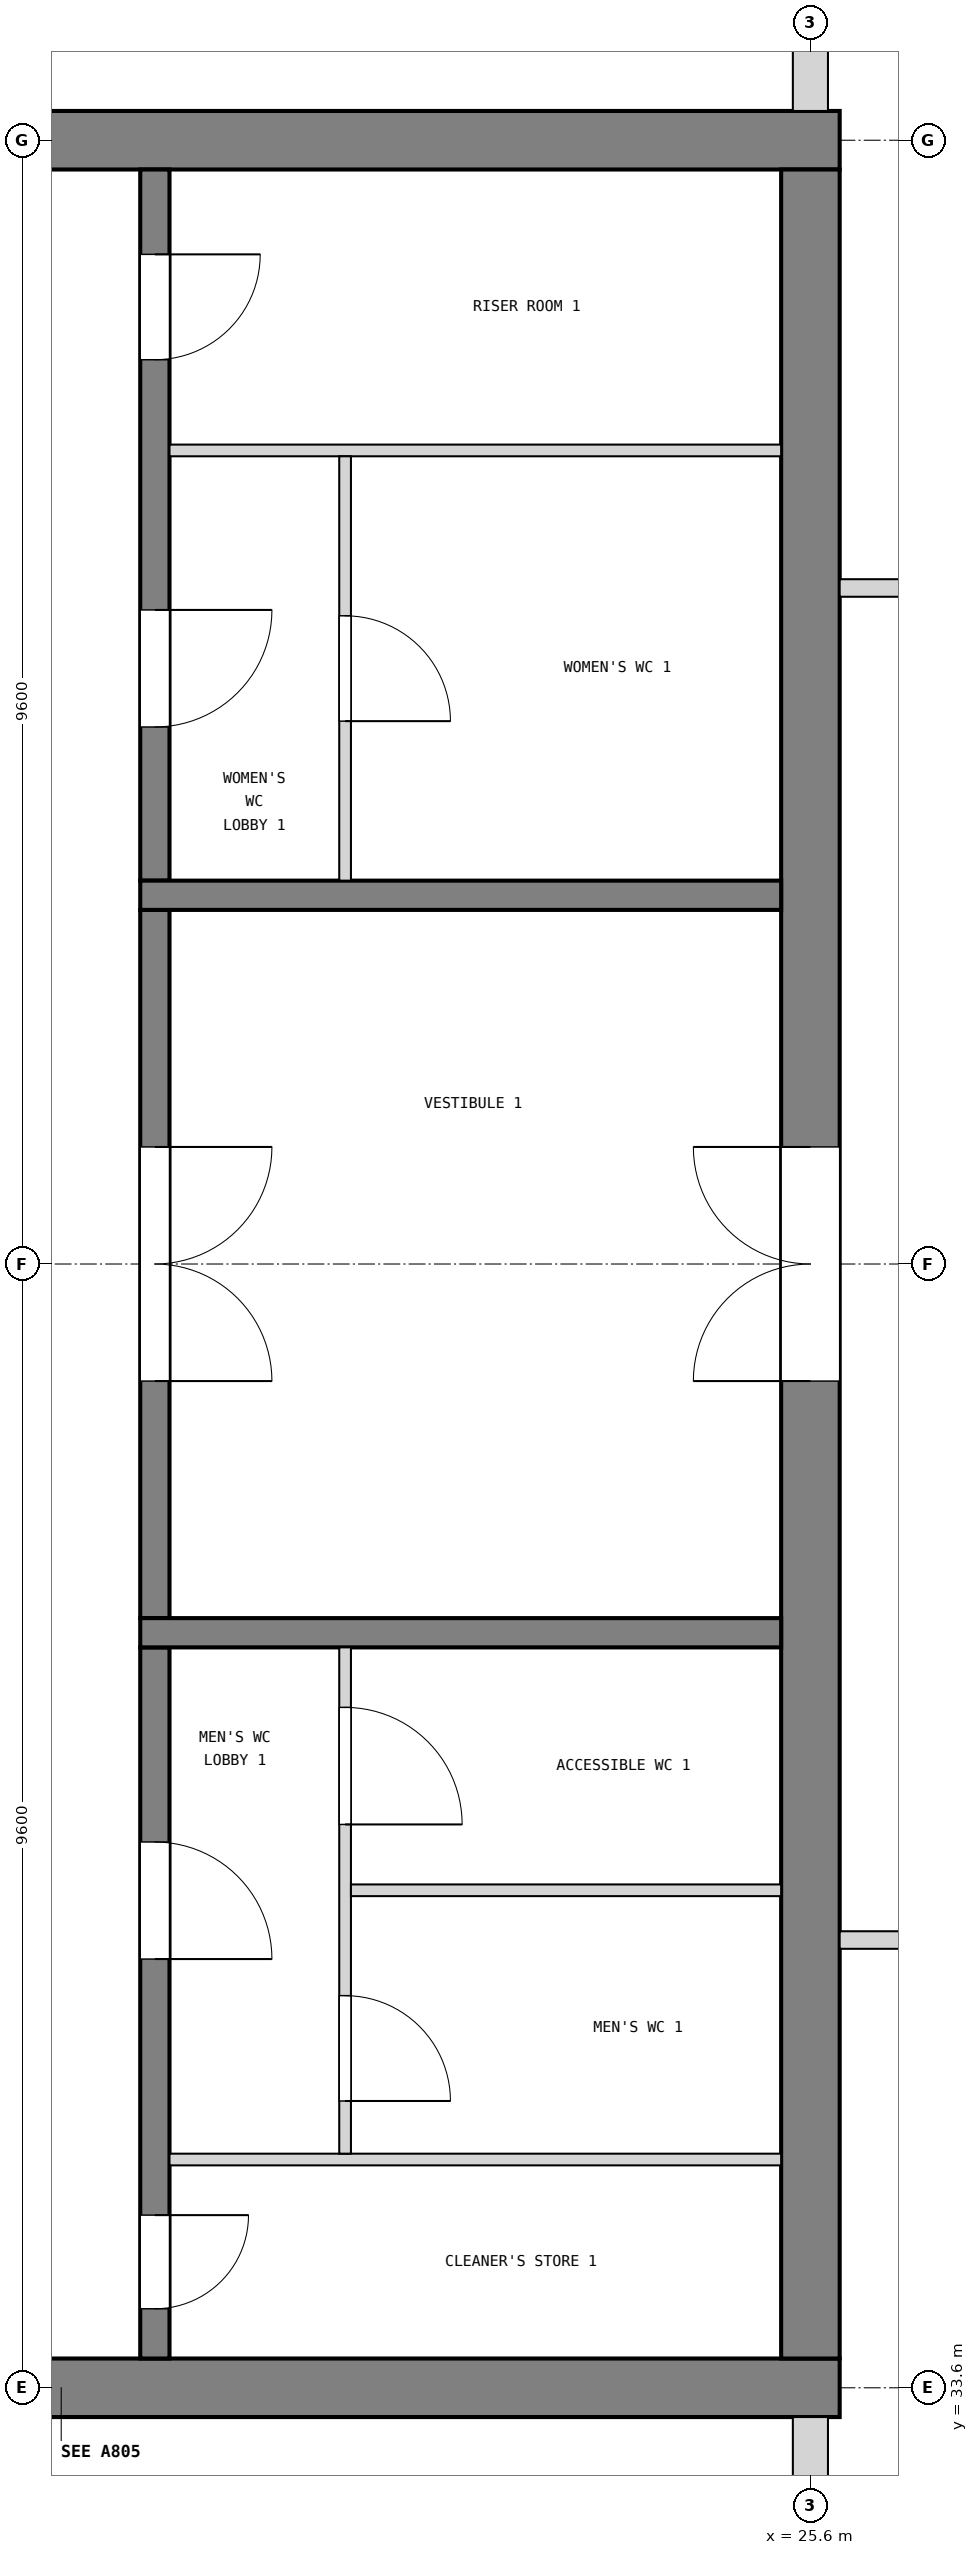
"""IFC4 building model, lengths in metres.
Left out: names, types, materials, properties, quantities, classifications, styles, units other than length and angle.
Written with IfcOpenShell. Run it as: python <this file> out.ifc"""

import sys

from ifc_helpers import new_model, si_unit, direction, frame, frame_2d, origin, place, context, subcontext, project, spatial, rectangle, extrude, element, fill, save


model = new_model("IFC4")
c1 = context("Model", 3, precision=1e-05, world=origin(), true_north=direction((0.0, 1.0)))
c2 = subcontext(c1, "Body", "Model", "MODEL_VIEW")
j1 = project(units=[si_unit("LENGTHUNIT", "METRE"), si_unit("PLANEANGLEUNIT", "RADIAN")], contexts=[c1])
p1 = place(None, origin())
s1 = spatial("IfcSite", under=j1, at=p1, CompositionType="ELEMENT")
p2 = place(p1, origin())
s2 = spatial("IfcBuilding", under=s1, at=p2, CompositionType="ELEMENT")
p3 = place(p2, frame((0.0, 0.0, 12.9)))
s3 = spatial("IfcBuildingStorey", under=s2, at=p3, CompositionType="ELEMENT", Elevation=12.9)
p4 = place(p3, frame((12.55, 52.8, 0.0), z_axis=(0.0, 0.0, 1.0), x_axis=(1.0, 0.0, 0.0)))
e1 = element("IfcWall", 1, at=p4, inside=s3, PredefinedType="SHEAR", context=c2, shape_type="SweptSolid", body=[
    extrude(rectangle(XDim=13.3, YDim=0.5, at=frame_2d((6.65, 0.0))), origin(), (0.0, 0.0, 1.0), 4.2),
])
p5 = place(p4, frame((1.85, 0.0, 1.0)))
e2 = element("IfcOpeningElement", 2, at=p5, cuts=e1, PredefinedType="OPENING", context=c2, shape_type="SweptSolid", body=[
    extrude(rectangle(XDim=0.4, YDim=2.0, at=frame_2d((0.2, 1.0))), frame((0.0, 0.26, 0.0), z_axis=(0.0, -1.0, 0.0), x_axis=(1.0, 0.0, 0.0)), (0.0, 0.0, 1.0), 0.52),
])
p6 = place(p3, frame((12.55, 33.6, 0.0), z_axis=(0.0, 0.0, 1.0), x_axis=(1.0, 0.0, 0.0)))
e3 = element("IfcWall", 3, at=p6, inside=s3, PredefinedType="SHEAR", context=c2, shape_type="SweptSolid", body=[
    extrude(rectangle(XDim=13.3, YDim=0.5, at=frame_2d((6.65, 0.0))), origin(), (0.0, 0.0, 1.0), 4.2),
])
p7 = place(p6, frame((1.85, 0.0, 1.0)))
e4 = element("IfcOpeningElement", 4, at=p7, cuts=e3, PredefinedType="OPENING", context=c2, shape_type="SweptSolid", body=[
    extrude(rectangle(XDim=0.4, YDim=2.0, at=frame_2d((0.2, 1.0))), frame((0.0, 0.26, 0.0), z_axis=(0.0, -1.0, 0.0), x_axis=(1.0, 0.0, 0.0)), (0.0, 0.0, 1.0), 0.52),
])
p8 = place(p3, frame((25.6, 33.85, 0.0), z_axis=(0.0, 0.0, 1.0), x_axis=(0.0, 1.0, 0.0)))
e5 = element("IfcWall", 5, at=p8, inside=s3, PredefinedType="SHEAR", context=c2, shape_type="SweptSolid", body=[
    extrude(rectangle(XDim=18.7, YDim=0.5, at=frame_2d((9.35, 0.0))), origin(), (0.0, 0.0, 1.0), 4.2),
])
p9 = place(p8, frame((8.35, 0.0, 0.0)))
e6 = element("IfcOpeningElement", 6, at=p9, cuts=e5, PredefinedType="OPENING", context=c2, shape_type="SweptSolid", body=[
    extrude(rectangle(XDim=2.0, YDim=2.1, at=frame_2d((1.0, 1.05))), frame((0.0, 0.26, 0.0), z_axis=(0.0, -1.0, 0.0), x_axis=(1.0, 0.0, 0.0)), (0.0, 0.0, 1.0), 0.52),
])
p10 = place(p3, frame((25.6, 31.0, 0.0), z_axis=(0.0, 0.0, 1.0), x_axis=(0.0, 1.0, 0.0)))
e7 = element("IfcWall", 7, at=p10, inside=s3, PredefinedType="SOLIDWALL", context=c2, shape_type="SweptSolid", body=[
    extrude(rectangle(XDim=2.35, YDim=0.3, at=frame_2d((1.175, 0.0))), origin(), (0.0, 0.0, 1.0), 3.18),
])
p11 = place(p3, frame((25.6, 53.05, 0.0), z_axis=(0.0, 0.0, 1.0), x_axis=(0.0, 1.0, 0.0)))
e8 = element("IfcWall", 8, at=p11, inside=s3, PredefinedType="SOLIDWALL", context=c2, shape_type="SweptSolid", body=[
    extrude(rectangle(XDim=2.35, YDim=0.3, at=frame_2d((1.175, 0.0))), origin(), (0.0, 0.0, 1.0), 3.18),
])
p12 = place(p3, frame((20.0, 33.85, 0.0), z_axis=(0.0, 0.0, 1.0), x_axis=(0.0, 1.0, 0.0)))
e9 = element("IfcWall", 9, at=p12, inside=s3, PredefinedType="SOLIDWALL", context=c2, shape_type="SweptSolid", body=[
    extrude(rectangle(XDim=6.075, YDim=0.25, at=frame_2d((3.038, 0.0))), origin(), (0.0, 0.0, 1.0), 3.9),
])
p13 = place(p12, frame((0.425, 0.0, 0.0)))
e10 = element("IfcOpeningElement", 10, at=p13, cuts=e9, PredefinedType="OPENING", context=c2, shape_type="SweptSolid", body=[
    extrude(rectangle(XDim=0.8, YDim=2.1, at=frame_2d((0.4, 1.05))), frame((0.0, 0.135, 0.0), z_axis=(0.0, -1.0, 0.0), x_axis=(1.0, 0.0, 0.0)), (0.0, 0.0, 1.0), 0.27),
])
p14 = place(p12, frame((3.413, 0.0, 0.0)))
e11 = element("IfcOpeningElement", 11, at=p14, cuts=e9, PredefinedType="OPENING", context=c2, shape_type="SweptSolid", body=[
    extrude(rectangle(XDim=1.0, YDim=2.1, at=frame_2d((0.5, 1.05))), frame((0.0, 0.135, 0.0), z_axis=(0.0, -1.0, 0.0), x_axis=(1.0, 0.0, 0.0)), (0.0, 0.0, 1.0), 0.27),
])
p15 = place(p3, frame((20.0, 40.175, 0.0), z_axis=(0.0, 0.0, 1.0), x_axis=(0.0, 1.0, 0.0)))
e12 = element("IfcWall", 12, at=p15, inside=s3, PredefinedType="SOLIDWALL", context=c2, shape_type="SweptSolid", body=[
    extrude(rectangle(XDim=6.05, YDim=0.25, at=frame_2d((3.025, 0.0))), origin(), (0.0, 0.0, 1.0), 3.9),
])
p16 = place(p15, frame((2.025, 0.0, 0.0)))
e13 = element("IfcOpeningElement", 13, at=p16, cuts=e12, PredefinedType="OPENING", context=c2, shape_type="SweptSolid", body=[
    extrude(rectangle(XDim=2.0, YDim=2.1, at=frame_2d((1.0, 1.05))), frame((0.0, 0.135, 0.0), z_axis=(0.0, -1.0, 0.0), x_axis=(1.0, 0.0, 0.0)), (0.0, 0.0, 1.0), 0.27),
])
p17 = place(p3, frame((20.0, 46.475, 0.0), z_axis=(0.0, 0.0, 1.0), x_axis=(0.0, 1.0, 0.0)))
e14 = element("IfcWall", 14, at=p17, inside=s3, PredefinedType="SOLIDWALL", context=c2, shape_type="SweptSolid", body=[
    extrude(rectangle(XDim=6.075, YDim=0.25, at=frame_2d((3.038, 0.0))), origin(), (0.0, 0.0, 1.0), 3.9),
])
p18 = place(p17, frame((1.312, 0.0, 0.0)))
e15 = element("IfcOpeningElement", 15, at=p18, cuts=e14, PredefinedType="OPENING", context=c2, shape_type="SweptSolid", body=[
    extrude(rectangle(XDim=1.0, YDim=2.1, at=frame_2d((0.5, 1.05))), frame((0.0, 0.135, 0.0), z_axis=(0.0, -1.0, 0.0), x_axis=(1.0, 0.0, 0.0)), (0.0, 0.0, 1.0), 0.27),
])
p19 = place(p17, frame((4.45, 0.0, 0.0)))
e16 = element("IfcOpeningElement", 16, at=p19, cuts=e14, PredefinedType="OPENING", context=c2, shape_type="SweptSolid", body=[
    extrude(rectangle(XDim=0.9, YDim=2.1, at=frame_2d((0.45, 1.05))), frame((0.0, 0.135, 0.0), z_axis=(0.0, -1.0, 0.0), x_axis=(1.0, 0.0, 0.0)), (0.0, 0.0, 1.0), 0.27),
])
for number, where, z_axis, x_axis in (
    (17, (19.875, 40.05, 0.0), (0.0, 0.0, 1.0), (1.0, 0.0, 0.0)),
    (18, (19.875, 46.35, 0.0), (0.0, 0.0, 1.0), (1.0, 0.0, 0.0)),
):
    element("IfcWall", number, at=place(p3, frame(where, z_axis=z_axis, x_axis=x_axis)), inside=s3, PredefinedType="SOLIDWALL", context=c2, shape_type="SweptSolid", body=[
        extrude(rectangle(XDim=5.475, YDim=0.25, at=frame_2d((2.738, 0.0))), origin(), (0.0, 0.0, 1.0), 3.9),
    ])
p20 = place(p3, frame((20.125, 35.55, 0.0), z_axis=(0.0, 0.0, 1.0), x_axis=(1.0, 0.0, 0.0)))
e19 = element("IfcWall", 19, at=p20, inside=s3, PredefinedType="PARTITIONING", context=c2, shape_type="SweptSolid", body=[
    extrude(rectangle(XDim=5.225, YDim=0.1, at=frame_2d((2.613, 0.0))), origin(), (0.0, 0.0, 1.0), 3.9),
])
p21 = place(p3, frame((21.625, 35.6, 0.0), z_axis=(0.0, 0.0, 1.0), x_axis=(0.0, 1.0, 0.0)))
e20 = element("IfcWall", 20, at=p21, inside=s3, PredefinedType="PARTITIONING", context=c2, shape_type="SweptSolid", body=[
    extrude(rectangle(XDim=4.325, YDim=0.1, at=frame_2d((2.163, 0.0))), origin(), (0.0, 0.0, 1.0), 3.9),
])
p22 = place(p21, frame((0.45, 0.0, 0.0)))
e21 = element("IfcOpeningElement", 21, at=p22, cuts=e20, PredefinedType="OPENING", context=c2, shape_type="SweptSolid", body=[
    extrude(rectangle(XDim=0.9, YDim=2.1, at=frame_2d((0.45, 1.05))), frame((0.0, 0.06, 0.0), z_axis=(0.0, -1.0, 0.0), x_axis=(1.0, 0.0, 0.0)), (0.0, 0.0, 1.0), 0.12),
])
p23 = place(p21, frame((2.812, 0.0, 0.0)))
e22 = element("IfcOpeningElement", 22, at=p23, cuts=e20, PredefinedType="OPENING", context=c2, shape_type="SweptSolid", body=[
    extrude(rectangle(XDim=1.0, YDim=2.1, at=frame_2d((0.5, 1.05))), frame((0.0, 0.06, 0.0), z_axis=(0.0, -1.0, 0.0), x_axis=(1.0, 0.0, 0.0)), (0.0, 0.0, 1.0), 0.12),
])
p24 = place(p3, frame((21.675, 37.85, 0.0), z_axis=(0.0, 0.0, 1.0), x_axis=(1.0, 0.0, 0.0)))
e23 = element("IfcWall", 23, at=p24, inside=s3, PredefinedType="PARTITIONING", context=c2, shape_type="SweptSolid", body=[
    extrude(rectangle(XDim=3.675, YDim=0.1, at=frame_2d((1.837, 0.0))), origin(), (0.0, 0.0, 1.0), 3.9),
])
p25 = place(p3, frame((20.125, 50.15, 0.0), z_axis=(0.0, 0.0, 1.0), x_axis=(1.0, 0.0, 0.0)))
e24 = element("IfcWall", 24, at=p25, inside=s3, PredefinedType="PARTITIONING", context=c2, shape_type="SweptSolid", body=[
    extrude(rectangle(XDim=5.225, YDim=0.1, at=frame_2d((2.613, 0.0))), origin(), (0.0, 0.0, 1.0), 3.9),
])
p26 = place(p3, frame((21.625, 46.475, 0.0), z_axis=(0.0, 0.0, 1.0), x_axis=(0.0, 1.0, 0.0)))
e25 = element("IfcWall", 25, at=p26, inside=s3, PredefinedType="PARTITIONING", context=c2, shape_type="SweptSolid", body=[
    extrude(rectangle(XDim=3.625, YDim=0.1, at=frame_2d((1.812, 0.0))), origin(), (0.0, 0.0, 1.0), 3.9),
])
p27 = place(p26, frame((1.363, 0.0, 0.0)))
e26 = element("IfcOpeningElement", 26, at=p27, cuts=e25, PredefinedType="OPENING", context=c2, shape_type="SweptSolid", body=[
    extrude(rectangle(XDim=0.9, YDim=2.1, at=frame_2d((0.45, 1.05))), frame((0.0, 0.06, 0.0), z_axis=(0.0, -1.0, 0.0), x_axis=(1.0, 0.0, 0.0)), (0.0, 0.0, 1.0), 0.12),
])
p28 = place(p3, frame((25.85, 37.425, 0.0), z_axis=(0.0, 0.0, 1.0), x_axis=(1.0, 0.0, 0.0)))
e27 = element("IfcWall", 27, at=p28, inside=s3, PredefinedType="PARTITIONING", context=c2, shape_type="SweptSolid", body=[
    extrude(rectangle(XDim=18.77, YDim=0.15, at=frame_2d((9.385, 0.0))), origin(), (0.0, 0.0, 1.0), 3.98),
])
p29 = place(p28, frame((3.75, 0.0, 0.0)))
e28 = element("IfcOpeningElement", 28, at=p29, cuts=e27, PredefinedType="OPENING", context=c2, shape_type="SweptSolid", body=[
    extrude(rectangle(XDim=1.8, YDim=2.1, at=frame_2d((0.9, 1.05))), frame((0.0, 0.085, 0.0), z_axis=(0.0, -1.0, 0.0), x_axis=(1.0, 0.0, 0.0)), (0.0, 0.0, 1.0), 0.17),
])
p30 = place(p28, frame((13.1, 0.0, 0.0)))
e29 = element("IfcOpeningElement", 29, at=p30, cuts=e27, PredefinedType="OPENING", context=c2, shape_type="SweptSolid", body=[
    extrude(rectangle(XDim=1.8, YDim=2.1, at=frame_2d((0.9, 1.05))), frame((0.0, 0.085, 0.0), z_axis=(0.0, -1.0, 0.0), x_axis=(1.0, 0.0, 0.0)), (0.0, 0.0, 1.0), 0.17),
])
p31 = place(p3, frame((25.85, 48.975, 0.0), z_axis=(0.0, 0.0, 1.0), x_axis=(1.0, 0.0, 0.0)))
e30 = element("IfcWall", 30, at=p31, inside=s3, PredefinedType="PARTITIONING", context=c2, shape_type="SweptSolid", body=[
    extrude(rectangle(XDim=9.35, YDim=0.15, at=frame_2d((4.675, 0.0))), origin(), (0.0, 0.0, 1.0), 3.98),
])
p32 = place(p31, frame((3.75, 0.0, 0.0)))
e31 = element("IfcOpeningElement", 31, at=p32, cuts=e30, PredefinedType="OPENING", context=c2, shape_type="SweptSolid", body=[
    extrude(rectangle(XDim=1.8, YDim=2.1, at=frame_2d((0.9, 1.05))), frame((0.0, 0.085, 0.0), z_axis=(0.0, -1.0, 0.0), x_axis=(1.0, 0.0, 0.0)), (0.0, 0.0, 1.0), 0.17),
])
p33 = place(p16, frame((2.0, 0.0, 0.0), z_axis=(0.0, 0.0, 1.0), x_axis=(-1.0, 0.0, 0.0)))
e32 = element("IfcDoor", 32, at=p33, inside=s3, OperationType="DOUBLE_DOOR_SINGLE_SWING", PredefinedType="DOOR", context=c2, shape_type="SweptSolid", body=[
    extrude(rectangle(XDim=2.0, YDim=2.1, at=frame_2d((1.0, 1.05))), frame((0.0, 0.025, 0.0), z_axis=(0.0, -1.0, 0.0), x_axis=(1.0, 0.0, 0.0)), (0.0, 0.0, 1.0), 0.05),
])
fill(e13, e32)
p34 = place(p9, origin())
e33 = element("IfcDoor", 33, at=p34, inside=s3, OperationType="DOUBLE_DOOR_SINGLE_SWING", PredefinedType="DOOR", context=c2, shape_type="SweptSolid", body=[
    extrude(rectangle(XDim=2.0, YDim=2.1, at=frame_2d((1.0, 1.05))), frame((0.0, 0.025, 0.0), z_axis=(0.0, -1.0, 0.0), x_axis=(1.0, 0.0, 0.0)), (0.0, 0.0, 1.0), 0.05),
])
fill(e6, e33)
p35 = place(p13, frame((0.8, 0.0, 0.0), z_axis=(0.0, 0.0, 1.0), x_axis=(-1.0, 0.0, 0.0)))
e34 = element("IfcDoor", 34, at=p35, inside=s3, OperationType="SINGLE_SWING_LEFT", PredefinedType="DOOR", context=c2, shape_type="SweptSolid", body=[
    extrude(rectangle(XDim=0.8, YDim=2.1, at=frame_2d((0.4, 1.05))), frame((0.0, 0.025, 0.0), z_axis=(0.0, -1.0, 0.0), x_axis=(1.0, 0.0, 0.0)), (0.0, 0.0, 1.0), 0.05),
])
fill(e10, e34)
p36 = place(p14, frame((1.0, 0.0, 0.0), z_axis=(0.0, 0.0, 1.0), x_axis=(-1.0, 0.0, 0.0)))
e35 = element("IfcDoor", 35, at=p36, inside=s3, OperationType="SINGLE_SWING_RIGHT", PredefinedType="DOOR", context=c2, shape_type="SweptSolid", body=[
    extrude(rectangle(XDim=1.0, YDim=2.1, at=frame_2d((0.5, 1.05))), frame((0.0, 0.025, 0.0), z_axis=(0.0, -1.0, 0.0), x_axis=(1.0, 0.0, 0.0)), (0.0, 0.0, 1.0), 0.05),
])
fill(e11, e35)
p37 = place(p22, frame((0.9, 0.0, 0.0), z_axis=(0.0, 0.0, 1.0), x_axis=(-1.0, 0.0, 0.0)))
e36 = element("IfcDoor", 36, at=p37, inside=s3, OperationType="SINGLE_SWING_RIGHT", PredefinedType="DOOR", context=c2, shape_type="SweptSolid", body=[
    extrude(rectangle(XDim=0.9, YDim=2.1, at=frame_2d((0.45, 1.05))), frame((0.0, 0.025, 0.0), z_axis=(0.0, -1.0, 0.0), x_axis=(1.0, 0.0, 0.0)), (0.0, 0.0, 1.0), 0.05),
])
fill(e21, e36)
p38 = place(p23, frame((1.0, 0.0, 0.0), z_axis=(0.0, 0.0, 1.0), x_axis=(-1.0, 0.0, 0.0)))
e37 = element("IfcDoor", 37, at=p38, inside=s3, OperationType="SINGLE_SWING_RIGHT", PredefinedType="DOOR", context=c2, shape_type="SweptSolid", body=[
    extrude(rectangle(XDim=1.0, YDim=2.1, at=frame_2d((0.5, 1.05))), frame((0.0, 0.025, 0.0), z_axis=(0.0, -1.0, 0.0), x_axis=(1.0, 0.0, 0.0)), (0.0, 0.0, 1.0), 0.05),
])
fill(e22, e37)
p39 = place(p18, frame((1.0, 0.0, 0.0), z_axis=(0.0, 0.0, 1.0), x_axis=(-1.0, 0.0, 0.0)))
e38 = element("IfcDoor", 38, at=p39, inside=s3, OperationType="SINGLE_SWING_LEFT", PredefinedType="DOOR", context=c2, shape_type="SweptSolid", body=[
    extrude(rectangle(XDim=1.0, YDim=2.1, at=frame_2d((0.5, 1.05))), frame((0.0, 0.025, 0.0), z_axis=(0.0, -1.0, 0.0), x_axis=(1.0, 0.0, 0.0)), (0.0, 0.0, 1.0), 0.05),
])
fill(e15, e38)
p40 = place(p27, frame((0.9, 0.0, 0.0), z_axis=(0.0, 0.0, 1.0), x_axis=(-1.0, 0.0, 0.0)))
e39 = element("IfcDoor", 39, at=p40, inside=s3, OperationType="SINGLE_SWING_RIGHT", PredefinedType="DOOR", context=c2, shape_type="SweptSolid", body=[
    extrude(rectangle(XDim=0.9, YDim=2.1, at=frame_2d((0.45, 1.05))), frame((0.0, 0.025, 0.0), z_axis=(0.0, -1.0, 0.0), x_axis=(1.0, 0.0, 0.0)), (0.0, 0.0, 1.0), 0.05),
])
fill(e26, e39)
p41 = place(p19, frame((0.9, 0.0, 0.0), z_axis=(0.0, 0.0, 1.0), x_axis=(-1.0, 0.0, 0.0)))
e40 = element("IfcDoor", 40, at=p41, inside=s3, OperationType="SINGLE_SWING_LEFT", PredefinedType="DOOR", context=c2, shape_type="SweptSolid", body=[
    extrude(rectangle(XDim=0.9, YDim=2.1, at=frame_2d((0.45, 1.05))), frame((0.0, 0.025, 0.0), z_axis=(0.0, -1.0, 0.0), x_axis=(1.0, 0.0, 0.0)), (0.0, 0.0, 1.0), 0.05),
])
fill(e16, e40)
save(model, sys.argv[1])
